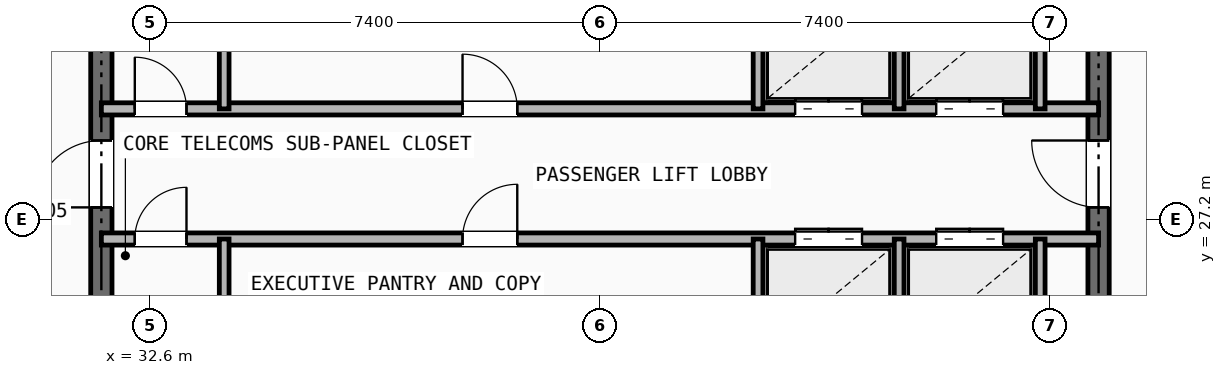
"""IFC4 building model, lengths in metres.
Left out: names, types, materials, properties, quantities, classifications, styles, units other than length and angle.
Written with IfcOpenShell. Run it as: python <this file> out.ifc"""

import sys

from ifc_helpers import new_model, si_unit, direction, frame, frame_2d, origin, place, context, subcontext, project, spatial, rectangle, extrude, element, fill, save


model = new_model("IFC4")
c1 = context("Model", 3, precision=1e-05, world=origin(), true_north=direction((0.0, 1.0)))
c2 = subcontext(c1, "Body", "Model", "MODEL_VIEW")
j1 = project(units=[si_unit("LENGTHUNIT", "METRE"), si_unit("PLANEANGLEUNIT", "RADIAN")], contexts=[c1])
p1 = place(None, origin())
s1 = spatial("IfcSite", under=j1, at=p1, CompositionType="ELEMENT")
p2 = place(p1, origin())
s2 = spatial("IfcBuilding", under=s1, at=p2, CompositionType="ELEMENT")
p3 = place(p2, frame((0.0, 0.0, 218.9)))
s3 = spatial("IfcBuildingStorey", under=s2, at=p3, CompositionType="ELEMENT", Elevation=218.9)
p4 = place(p3, frame((31.8, 16.4, 0.0), z_axis=(0.0, 0.0, 1.0), x_axis=(0.0, 1.0, 0.0)))
e1 = element("IfcWall", 1, at=p4, inside=s3, PredefinedType="SHEAR", context=c2, shape_type="SweptSolid", body=[
    extrude(rectangle(XDim=14.8, YDim=0.35, at=frame_2d((7.4, 0.0))), origin(), (0.0, 0.0, 1.0), 3.25),
])
p5 = place(p4, frame((11.0, 0.0, 0.0)))
e2 = element("IfcOpeningElement", 2, at=p5, cuts=e1, PredefinedType="OPENING", context=c2, shape_type="SweptSolid", body=[
    extrude(rectangle(XDim=1.1, YDim=2.15, at=frame_2d((0.55, 1.075))), frame((0.0, 0.185, 0.0), z_axis=(0.0, -1.0, 0.0), x_axis=(1.0, 0.0, 0.0)), (0.0, 0.0, 1.0), 0.37),
])
p6 = place(p3, frame((48.2, 16.4, 0.0), z_axis=(0.0, 0.0, 1.0), x_axis=(0.0, 1.0, 0.0)))
e3 = element("IfcWall", 3, at=p6, inside=s3, PredefinedType="SHEAR", context=c2, shape_type="SweptSolid", body=[
    extrude(rectangle(XDim=14.8, YDim=0.35, at=frame_2d((7.4, 0.0))), origin(), (0.0, 0.0, 1.0), 3.25),
])
p7 = place(p6, frame((11.0, 0.0, 0.0)))
e4 = element("IfcOpeningElement", 4, at=p7, cuts=e3, PredefinedType="OPENING", context=c2, shape_type="SweptSolid", body=[
    extrude(rectangle(XDim=1.1, YDim=2.15, at=frame_2d((0.55, 1.075))), frame((0.0, 0.185, 0.0), z_axis=(0.0, -1.0, 0.0), x_axis=(1.0, 0.0, 0.0)), (0.0, 0.0, 1.0), 0.37),
])
p8 = place(p3, frame((31.8, 29.02, 0.0), z_axis=(0.0, 0.0, 1.0), x_axis=(1.0, 0.0, 0.0)))
e5 = element("IfcWall", 5, at=p8, inside=s3, PredefinedType="SOLIDWALL", context=c2, shape_type="SweptSolid", body=[
    extrude(rectangle(XDim=16.4, YDim=0.2, at=frame_2d((8.2, 0.0))), origin(), (0.0, 0.0, 1.0), 2.705),
])
p9 = place(p8, frame((0.55, 0.0, 0.0)))
e6 = element("IfcOpeningElement", 6, at=p9, cuts=e5, PredefinedType="OPENING", context=c2, shape_type="SweptSolid", body=[
    extrude(rectangle(XDim=0.85, YDim=2.05, at=frame_2d((0.425, 1.025))), frame((0.0, 0.11, 0.0), z_axis=(0.0, -1.0, 0.0), x_axis=(1.0, 0.0, 0.0)), (0.0, 0.0, 1.0), 0.22),
])
p10 = place(p8, frame((5.94, 0.0, 0.0)))
e7 = element("IfcOpeningElement", 7, at=p10, cuts=e5, PredefinedType="OPENING", context=c2, shape_type="SweptSolid", body=[
    extrude(rectangle(XDim=0.9, YDim=2.1, at=frame_2d((0.45, 1.05))), frame((0.0, 0.11, 0.0), z_axis=(0.0, -1.0, 0.0), x_axis=(1.0, 0.0, 0.0)), (0.0, 0.0, 1.0), 0.22),
])
p11 = place(p8, frame((11.41, 0.0, 0.0)))
e8 = element("IfcOpeningElement", 8, at=p11, cuts=e5, PredefinedType="OPENING", context=c2, shape_type="SweptSolid", body=[
    extrude(rectangle(XDim=1.1, YDim=2.15, at=frame_2d((0.55, 1.075))), frame((0.0, 0.11, 0.0), z_axis=(0.0, -1.0, 0.0), x_axis=(1.0, 0.0, 0.0)), (0.0, 0.0, 1.0), 0.22),
])
p12 = place(p8, frame((13.73, 0.0, 0.0)))
e9 = element("IfcOpeningElement", 9, at=p12, cuts=e5, PredefinedType="OPENING", context=c2, shape_type="SweptSolid", body=[
    extrude(rectangle(XDim=1.1, YDim=2.15, at=frame_2d((0.55, 1.075))), frame((0.0, 0.11, 0.0), z_axis=(0.0, -1.0, 0.0), x_axis=(1.0, 0.0, 0.0)), (0.0, 0.0, 1.0), 0.22),
])
p13 = place(p3, frame((31.8, 26.88, 0.0), z_axis=(0.0, 0.0, 1.0), x_axis=(1.0, 0.0, 0.0)))
e10 = element("IfcWall", 10, at=p13, inside=s3, PredefinedType="SOLIDWALL", context=c2, shape_type="SweptSolid", body=[
    extrude(rectangle(XDim=16.4, YDim=0.2, at=frame_2d((8.2, 0.0))), origin(), (0.0, 0.0, 1.0), 2.705),
])
p14 = place(p13, frame((0.55, 0.0, 0.0)))
e11 = element("IfcOpeningElement", 11, at=p14, cuts=e10, PredefinedType="OPENING", context=c2, shape_type="SweptSolid", body=[
    extrude(rectangle(XDim=0.85, YDim=2.05, at=frame_2d((0.425, 1.025))), frame((0.0, 0.11, 0.0), z_axis=(0.0, -1.0, 0.0), x_axis=(1.0, 0.0, 0.0)), (0.0, 0.0, 1.0), 0.22),
])
p15 = place(p13, frame((5.94, 0.0, 0.0)))
e12 = element("IfcOpeningElement", 12, at=p15, cuts=e10, PredefinedType="OPENING", context=c2, shape_type="SweptSolid", body=[
    extrude(rectangle(XDim=0.9, YDim=2.1, at=frame_2d((0.45, 1.05))), frame((0.0, 0.11, 0.0), z_axis=(0.0, -1.0, 0.0), x_axis=(1.0, 0.0, 0.0)), (0.0, 0.0, 1.0), 0.22),
])
p16 = place(p13, frame((11.41, 0.0, 0.0)))
e13 = element("IfcOpeningElement", 13, at=p16, cuts=e10, PredefinedType="OPENING", context=c2, shape_type="SweptSolid", body=[
    extrude(rectangle(XDim=1.1, YDim=2.15, at=frame_2d((0.55, 1.075))), frame((0.0, 0.11, 0.0), z_axis=(0.0, -1.0, 0.0), x_axis=(1.0, 0.0, 0.0)), (0.0, 0.0, 1.0), 0.22),
])
p17 = place(p13, frame((13.73, 0.0, 0.0)))
e14 = element("IfcOpeningElement", 14, at=p17, cuts=e10, PredefinedType="OPENING", context=c2, shape_type="SweptSolid", body=[
    extrude(rectangle(XDim=1.1, YDim=2.15, at=frame_2d((0.55, 1.075))), frame((0.0, 0.11, 0.0), z_axis=(0.0, -1.0, 0.0), x_axis=(1.0, 0.0, 0.0)), (0.0, 0.0, 1.0), 0.22),
])
p18 = place(p3, frame((33.82, 29.02, 0.0), z_axis=(0.0, 0.0, 1.0), x_axis=(0.0, 1.0, 0.0)))
e15 = element("IfcWall", 15, at=p18, inside=s3, PredefinedType="SOLIDWALL", context=c2, shape_type="SweptSolid", body=[
    extrude(rectangle(XDim=2.18, YDim=0.16, at=frame_2d((1.09, 0.0))), origin(), (0.0, 0.0, 1.0), 2.705),
])
p19 = place(p3, frame((33.82, 24.8, 0.0), z_axis=(0.0, 0.0, 1.0), x_axis=(0.0, 1.0, 0.0)))
e16 = element("IfcWall", 16, at=p19, inside=s3, PredefinedType="SOLIDWALL", context=c2, shape_type="SweptSolid", body=[
    extrude(rectangle(XDim=2.08, YDim=0.16, at=frame_2d((1.04, 0.0))), origin(), (0.0, 0.0, 1.0), 3.25),
])
for number, where, z_axis, x_axis in (
    (17, (42.6, 29.02, 0.0), (0.0, 0.0, 1.0), (0.0, 1.0, 0.0)),
    (18, (44.92, 29.02, 0.0), (0.0, 0.0, 1.0), (0.0, 1.0, 0.0)),
    (19, (47.24, 29.02, 0.0), (0.0, 0.0, 1.0), (0.0, 1.0, 0.0)),
):
    element("IfcWall", number, at=place(p3, frame(where, z_axis=z_axis, x_axis=x_axis)), inside=s3, PredefinedType="SOLIDWALL", context=c2, shape_type="SweptSolid", body=[
        extrude(rectangle(XDim=2.18, YDim=0.16, at=frame_2d((1.09, 0.0))), origin(), (0.0, 0.0, 1.0), 2.705),
    ])
for number, where, z_axis, x_axis in (
    (20, (42.6, 24.8, 0.0), (0.0, 0.0, 1.0), (0.0, 1.0, 0.0)),
    (21, (44.92, 24.8, 0.0), (0.0, 0.0, 1.0), (0.0, 1.0, 0.0)),
    (22, (47.24, 24.8, 0.0), (0.0, 0.0, 1.0), (0.0, 1.0, 0.0)),
):
    element("IfcWall", number, at=place(p3, frame(where, z_axis=z_axis, x_axis=x_axis)), inside=s3, PredefinedType="SOLIDWALL", context=c2, shape_type="SweptSolid", body=[
        extrude(rectangle(XDim=2.08, YDim=0.16, at=frame_2d((1.04, 0.0))), origin(), (0.0, 0.0, 1.0), 3.25),
    ])
p20 = place(p9, origin())
e23 = element("IfcDoor", 23, at=p20, inside=s3, OperationType="SINGLE_SWING_LEFT", PredefinedType="DOOR", context=c2, shape_type="SweptSolid", body=[
    extrude(rectangle(XDim=0.85, YDim=2.05, at=frame_2d((0.425, 1.025))), frame((0.0, 0.025, 0.0), z_axis=(0.0, -1.0, 0.0), x_axis=(1.0, 0.0, 0.0)), (0.0, 0.0, 1.0), 0.05),
])
fill(e6, e23)
p21 = place(p14, origin())
e24 = element("IfcDoor", 24, at=p21, inside=s3, OperationType="SINGLE_SWING_RIGHT", PredefinedType="DOOR", context=c2, shape_type="SweptSolid", body=[
    extrude(rectangle(XDim=0.85, YDim=2.05, at=frame_2d((0.425, 1.025))), frame((0.0, 0.025, 0.0), z_axis=(0.0, -1.0, 0.0), x_axis=(1.0, 0.0, 0.0)), (0.0, 0.0, 1.0), 0.05),
])
fill(e11, e24)
p22 = place(p5, origin())
e25 = element("IfcDoor", 25, at=p22, inside=s3, OperationType="SINGLE_SWING_LEFT", PredefinedType="DOOR", context=c2, shape_type="SweptSolid", body=[
    extrude(rectangle(XDim=1.1, YDim=2.15, at=frame_2d((0.55, 1.075))), frame((0.0, 0.025, 0.0), z_axis=(0.0, -1.0, 0.0), x_axis=(1.0, 0.0, 0.0)), (0.0, 0.0, 1.0), 0.05),
])
fill(e2, e25)
p23 = place(p7, origin())
e26 = element("IfcDoor", 26, at=p23, inside=s3, OperationType="SINGLE_SWING_RIGHT", PredefinedType="DOOR", context=c2, shape_type="SweptSolid", body=[
    extrude(rectangle(XDim=1.1, YDim=2.15, at=frame_2d((0.55, 1.075))), frame((0.0, 0.025, 0.0), z_axis=(0.0, -1.0, 0.0), x_axis=(1.0, 0.0, 0.0)), (0.0, 0.0, 1.0), 0.05),
])
fill(e4, e26)
p24 = place(p10, origin())
e27 = element("IfcDoor", 27, at=p24, inside=s3, OperationType="SINGLE_SWING_LEFT", PredefinedType="DOOR", context=c2, shape_type="SweptSolid", body=[
    extrude(rectangle(XDim=0.9, YDim=2.1, at=frame_2d((0.45, 1.05))), frame((0.0, 0.025, 0.0), z_axis=(0.0, -1.0, 0.0), x_axis=(1.0, 0.0, 0.0)), (0.0, 0.0, 1.0), 0.05),
])
fill(e7, e27)
p25 = place(p15, origin())
e28 = element("IfcDoor", 28, at=p25, inside=s3, OperationType="SINGLE_SWING_RIGHT", PredefinedType="DOOR", context=c2, shape_type="SweptSolid", body=[
    extrude(rectangle(XDim=0.9, YDim=2.1, at=frame_2d((0.45, 1.05))), frame((0.0, 0.025, 0.0), z_axis=(0.0, -1.0, 0.0), x_axis=(1.0, 0.0, 0.0)), (0.0, 0.0, 1.0), 0.05),
])
fill(e12, e28)
p26 = place(p11, origin())
e29 = element("IfcDoor", 29, at=p26, inside=s3, OperationType="DOUBLE_DOOR_SLIDING", PredefinedType="DOOR", context=c2, shape_type="SweptSolid", body=[
    extrude(rectangle(XDim=1.1, YDim=2.15, at=frame_2d((0.55, 1.075))), frame((0.0, 0.025, 0.0), z_axis=(0.0, -1.0, 0.0), x_axis=(1.0, 0.0, 0.0)), (0.0, 0.0, 1.0), 0.05),
])
fill(e8, e29)
p27 = place(p12, origin())
e30 = element("IfcDoor", 30, at=p27, inside=s3, OperationType="DOUBLE_DOOR_SLIDING", PredefinedType="DOOR", context=c2, shape_type="SweptSolid", body=[
    extrude(rectangle(XDim=1.1, YDim=2.15, at=frame_2d((0.55, 1.075))), frame((0.0, 0.025, 0.0), z_axis=(0.0, -1.0, 0.0), x_axis=(1.0, 0.0, 0.0)), (0.0, 0.0, 1.0), 0.05),
])
fill(e9, e30)
p28 = place(p16, origin())
e31 = element("IfcDoor", 31, at=p28, inside=s3, OperationType="DOUBLE_DOOR_SLIDING", PredefinedType="DOOR", context=c2, shape_type="SweptSolid", body=[
    extrude(rectangle(XDim=1.1, YDim=2.15, at=frame_2d((0.55, 1.075))), frame((0.0, 0.025, 0.0), z_axis=(0.0, -1.0, 0.0), x_axis=(1.0, 0.0, 0.0)), (0.0, 0.0, 1.0), 0.05),
])
fill(e13, e31)
p29 = place(p17, origin())
e32 = element("IfcDoor", 32, at=p29, inside=s3, OperationType="DOUBLE_DOOR_SLIDING", PredefinedType="DOOR", context=c2, shape_type="SweptSolid", body=[
    extrude(rectangle(XDim=1.1, YDim=2.15, at=frame_2d((0.55, 1.075))), frame((0.0, 0.025, 0.0), z_axis=(0.0, -1.0, 0.0), x_axis=(1.0, 0.0, 0.0)), (0.0, 0.0, 1.0), 0.05),
])
fill(e14, e32)
save(model, sys.argv[1])
